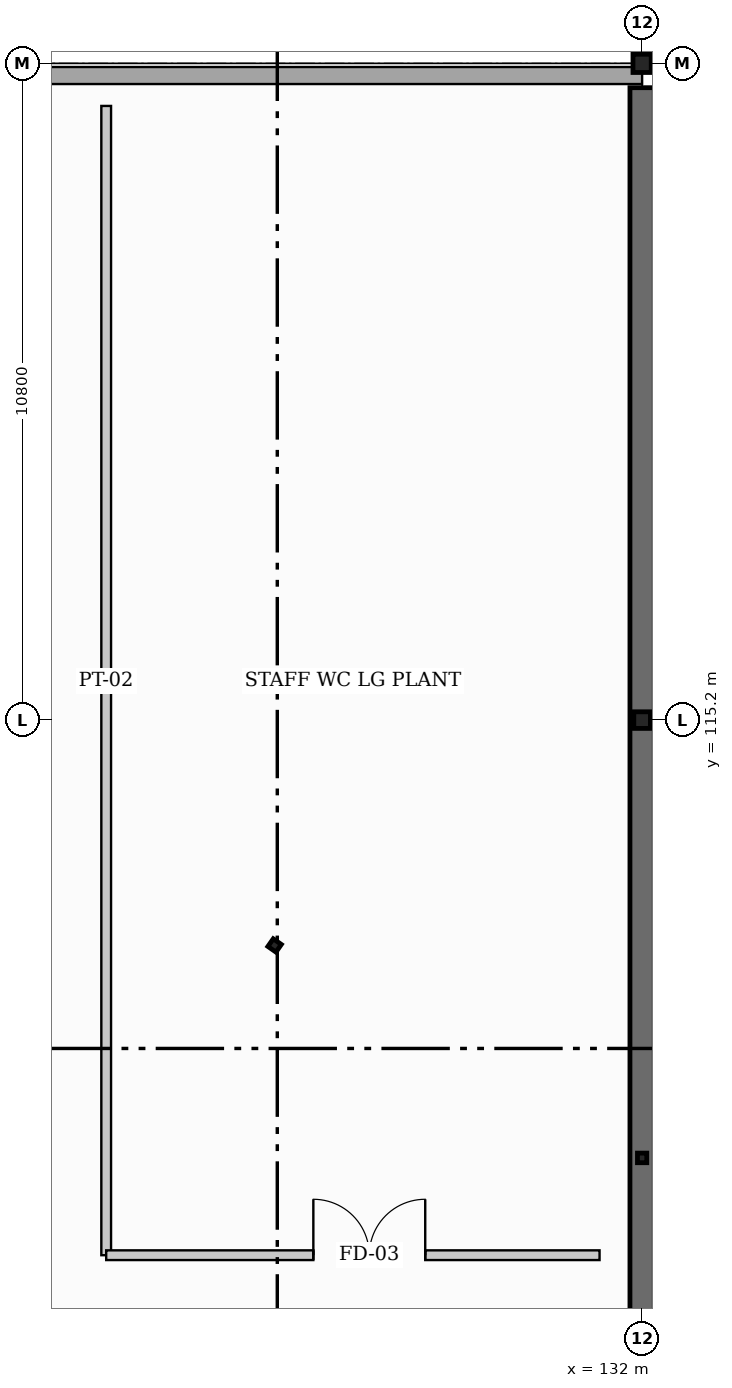
"""IFC4 building model, lengths in metres.
Left out: names, types, materials, properties, quantities, classifications, styles, units other than length and angle.
Written with IfcOpenShell. Run it as: python <this file> out.ifc"""

import sys

from ifc_helpers import new_model, si_unit, direction, frame, frame_2d, origin, origin_2d, place, context, subcontext, project, spatial, rectangle, hollow_rectangle, hollow_circle, i_section, extrude, element, fill, save


model = new_model("IFC4")
c1 = context("Model", 3, precision=1e-05, world=origin(), true_north=direction((0.0, 1.0)))
c2 = subcontext(c1, "Body", "Model", "MODEL_VIEW")
j1 = project(units=[si_unit("LENGTHUNIT", "METRE"), si_unit("PLANEANGLEUNIT", "RADIAN")], contexts=[c1])
p1 = place(None, origin())
s1 = spatial("IfcSite", under=j1, at=p1, CompositionType="ELEMENT")
p2 = place(p1, origin())
s2 = spatial("IfcBuilding", under=s1, at=p2, CompositionType="ELEMENT")
p3 = place(p2, frame((0.0, 0.0, -4.8)))
s3 = spatial("IfcBuildingStorey", under=s2, at=p3, CompositionType="ELEMENT", Elevation=-4.8)
p4 = place(p3, frame((132.0, 81.6, 0.0), z_axis=(0.0, 0.0, 1.0), x_axis=(0.0, 1.0, 0.0)))
e1 = element("IfcWall", 1, at=p4, inside=s3, PredefinedType="USERDEFINED", context=c2, shape_type="SweptSolid", body=[
    extrude(rectangle(XDim=44.0, YDim=0.4, at=frame_2d((22.0, 0.0))), origin(), (0.0, 0.0, 1.0), 4.8),
])
p5 = place(p3, frame((132.0, 115.2, 0.0), z_axis=(0.0, 0.0, 1.0), x_axis=(0.0, 1.0, 0.0)))
e2 = element("IfcColumn", 2, at=p5, inside=s3, PredefinedType="COLUMN", context=c2, shape_type="SweptSolid", body=[
    extrude(hollow_circle(Radius=0.136, WallThickness=0.013, at=origin_2d()), origin(), (0.0, 0.0, 1.0), 4.8),
])
p6 = place(p3, frame((132.0, 126.0, 0.0), z_axis=(0.0, 0.0, 1.0), x_axis=(0.0, 1.0, 0.0)))
e3 = element("IfcColumn", 3, at=p6, inside=s3, PredefinedType="COLUMN", context=c2, shape_type="SweptSolid", body=[
    extrude(hollow_rectangle(XDim=0.3, YDim=0.3, WallThickness=0.012, at=origin_2d()), origin(), (0.0, 0.0, 1.0), 4.8),
])
p7 = place(p3, frame((125.956, 111.494, 0.0), z_axis=(0.0, 0.0, 1.0), x_axis=(0.573576436351, 0.819152044289, 0.0)))
e4 = element("IfcColumn", 4, at=p7, inside=s3, PredefinedType="COLUMN", context=c2, shape_type="SweptSolid", body=[
    extrude(i_section(OverallWidth=0.154, OverallDepth=0.162, WebThickness=0.008, FlangeThickness=0.011, at=origin_2d()), origin(), (0.0, 0.0, 1.0), 4.8),
])
p8 = place(p3, frame((132.0, 108.0, 0.0), z_axis=(0.0, 0.0, 1.0), x_axis=(1.0, 0.0, 0.0)))
e5 = element("IfcColumn", 5, at=p8, inside=s3, PredefinedType="COLUMN", context=c2, shape_type="SweptSolid", body=[
    extrude(i_section(OverallWidth=0.153, OverallDepth=0.158, WebThickness=0.007, FlangeThickness=0.01, at=origin_2d()), origin(), (0.0, 0.0, 1.0), 4.8),
])
p9 = place(p3, frame((50.0, 125.8, 0.0), z_axis=(0.0, 0.0, 1.0), x_axis=(1.0, 0.0, 0.0)))
e6 = element("IfcWall", 6, at=p9, inside=s3, PredefinedType="STANDARD", context=c2, shape_type="SweptSolid", body=[
    extrude(rectangle(XDim=82.0, YDim=0.28, at=frame_2d((41.0, 0.0))), origin(), (0.0, 0.0, 1.0), 3.455),
])
p10 = place(p3, frame((123.186, 106.4, 0.0), z_axis=(0.0, 0.0, 1.0), x_axis=(0.0, 1.0, 0.0)))
e7 = element("IfcWall", 7, at=p10, inside=s3, PredefinedType="PARTITIONING", context=c2, shape_type="SweptSolid", body=[
    extrude(rectangle(XDim=18.9, YDim=0.16, at=frame_2d((9.45, 0.0))), origin(), (0.0, 0.0, 1.0), 4.43),
])
p11 = place(p3, frame((123.186, 106.4, 0.0), z_axis=(0.0, 0.0, 1.0), x_axis=(1.0, 0.0, 0.0)))
e8 = element("IfcWall", 8, at=p11, inside=s3, PredefinedType="PARTITIONING", context=c2, shape_type="SweptSolid", body=[
    extrude(rectangle(XDim=8.114, YDim=0.16, at=frame_2d((4.057, 0.0))), origin(), (0.0, 0.0, 1.0), 4.43),
])
p12 = place(p11, frame((3.407, 0.0, 0.0)))
e9 = element("IfcOpeningElement", 9, at=p12, cuts=e8, PredefinedType="OPENING", context=c2, shape_type="SweptSolid", body=[
    extrude(rectangle(XDim=1.84, YDim=2.22, at=frame_2d((0.92, 1.11))), frame((0.0, 0.09, 0.0), z_axis=(0.0, -1.0, 0.0), x_axis=(1.0, 0.0, 0.0)), (0.0, 0.0, 1.0), 0.18),
])
p13 = place(p12, origin())
e10 = element("IfcDoor", 10, at=p13, inside=s3, OperationType="DOUBLE_DOOR_SINGLE_SWING", PredefinedType="DOOR", context=c2, shape_type="SweptSolid", body=[
    extrude(rectangle(XDim=1.84, YDim=2.22, at=frame_2d((0.92, 1.11))), frame((0.0, 0.025, 0.0), z_axis=(0.0, -1.0, 0.0), x_axis=(1.0, 0.0, 0.0)), (0.0, 0.0, 1.0), 0.05),
])
fill(e9, e10)
save(model, sys.argv[1])
